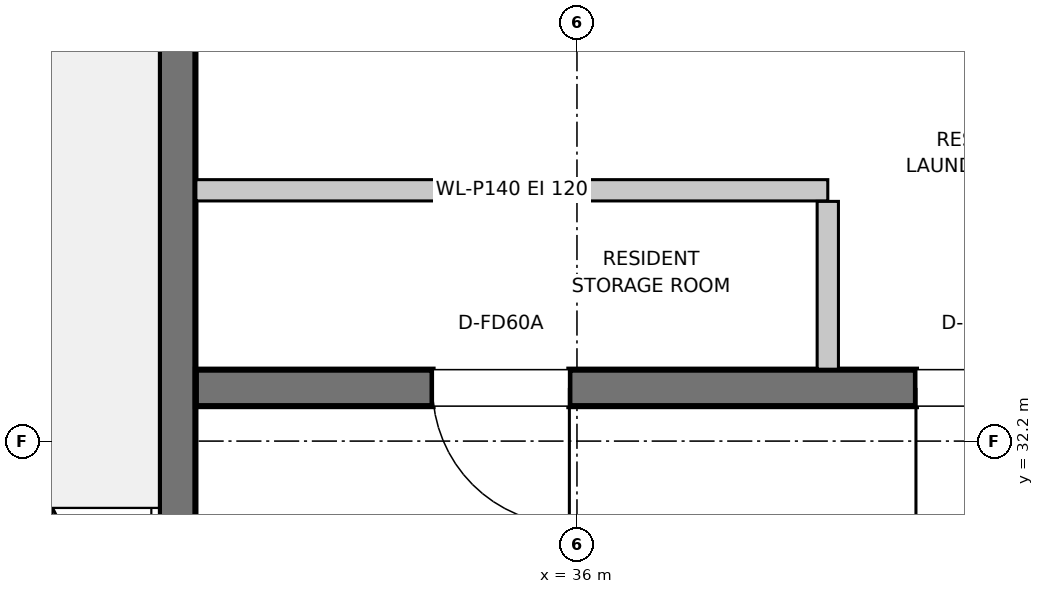
"""IFC4 building model, lengths in metres.
Left out: names, types, materials, properties, quantities, classifications, styles, units other than length and angle.
Written with IfcOpenShell. Run it as: python <this file> out.ifc"""

import sys

from ifc_helpers import new_model, si_unit, direction, frame, frame_2d, origin, place, context, subcontext, project, spatial, rectangle, extrude, element, fill, save


model = new_model("IFC4")
c1 = context("Model", 3, precision=1e-05, world=origin(), true_north=direction((0.0, 1.0)))
c2 = subcontext(c1, "Body", "Model", "MODEL_VIEW")
j1 = project(units=[si_unit("LENGTHUNIT", "METRE"), si_unit("PLANEANGLEUNIT", "RADIAN")], contexts=[c1])
p1 = place(None, origin())
s1 = spatial("IfcSite", under=j1, at=p1, CompositionType="ELEMENT")
p2 = place(p1, origin())
s2 = spatial("IfcBuilding", under=s1, at=p2, CompositionType="ELEMENT")
p3 = place(p2, frame((0.0, 0.0, 200.35)))
s3 = spatial("IfcBuildingStorey", under=s2, at=p3, CompositionType="ELEMENT", Elevation=200.35)
p4 = place(p3, frame((33.37, 26.953, 0.0), z_axis=(0.0, 0.0, 1.0), x_axis=(0.0, 1.0, 0.0)))
e1 = element("IfcWall", 1, at=p4, inside=s3, PredefinedType="SHEAR", context=c2, shape_type="SweptSolid", body=[
    extrude(rectangle(XDim=8.394, YDim=0.24, at=frame_2d((4.197, 0.0))), origin(), (0.0, 0.0, 1.0), 4.5),
])
p5 = place(p3, frame((33.493, 32.55, 0.0), z_axis=(0.0, 0.0, 1.0), x_axis=(1.0, 0.0, 0.0)))
e2 = element("IfcWall", 2, at=p5, inside=s3, PredefinedType="SHEAR", context=c2, shape_type="SweptSolid", body=[
    extrude(rectangle(XDim=13.214, YDim=0.24, at=frame_2d((6.607, 0.0))), origin(), (0.0, 0.0, 1.0), 4.5),
])
p6 = place(p5, frame((1.557, 0.0, 0.0)))
e3 = element("IfcOpeningElement", 3, at=p6, cuts=e2, PredefinedType="OPENING", context=c2, shape_type="SweptSolid", body=[
    extrude(rectangle(XDim=0.9, YDim=2.0, at=frame_2d((0.45, 1.0))), frame((0.0, 0.13, 0.0), z_axis=(0.0, -1.0, 0.0), x_axis=(1.0, 0.0, 0.0)), (0.0, 0.0, 1.0), 0.26),
])
p7 = place(p5, frame((4.737, 0.0, 0.0)))
e4 = element("IfcOpeningElement", 4, at=p7, cuts=e2, PredefinedType="OPENING", context=c2, shape_type="SweptSolid", body=[
    extrude(rectangle(XDim=0.9, YDim=2.0, at=frame_2d((0.45, 1.0))), frame((0.0, 0.13, 0.0), z_axis=(0.0, -1.0, 0.0), x_axis=(1.0, 0.0, 0.0)), (0.0, 0.0, 1.0), 0.26),
])
p8 = place(p5, frame((7.497, 0.0, 0.0)))
e5 = element("IfcOpeningElement", 5, at=p8, cuts=e2, PredefinedType="OPENING", context=c2, shape_type="SweptSolid", body=[
    extrude(rectangle(XDim=1.12, YDim=2.0, at=frame_2d((0.56, 1.0))), frame((0.0, 0.13, 0.0), z_axis=(0.0, -1.0, 0.0), x_axis=(1.0, 0.0, 0.0)), (0.0, 0.0, 1.0), 0.26),
])
p9 = place(p5, frame((9.597, 0.0, 0.0)))
e6 = element("IfcOpeningElement", 6, at=p9, cuts=e2, PredefinedType="OPENING", context=c2, shape_type="SweptSolid", body=[
    extrude(rectangle(XDim=1.12, YDim=2.0, at=frame_2d((0.56, 1.0))), frame((0.0, 0.13, 0.0), z_axis=(0.0, -1.0, 0.0), x_axis=(1.0, 0.0, 0.0)), (0.0, 0.0, 1.0), 0.26),
])
p10 = place(p5, frame((11.697, 0.0, 0.0)))
e7 = element("IfcOpeningElement", 7, at=p10, cuts=e2, PredefinedType="OPENING", context=c2, shape_type="SweptSolid", body=[
    extrude(rectangle(XDim=1.12, YDim=2.0, at=frame_2d((0.56, 1.0))), frame((0.0, 0.13, 0.0), z_axis=(0.0, -1.0, 0.0), x_axis=(1.0, 0.0, 0.0)), (0.0, 0.0, 1.0), 0.26),
])
p11 = place(p3, frame((33.493, 33.85, 0.0), z_axis=(0.0, 0.0, 1.0), x_axis=(1.0, 0.0, 0.0)))
e8 = element("IfcWall", 8, at=p11, inside=s3, PredefinedType="PARTITIONING", context=c2, shape_type="SweptSolid", body=[
    extrude(rectangle(XDim=4.157, YDim=0.14, at=frame_2d((2.079, 0.0))), origin(), (0.0, 0.0, 1.0), 4.245),
])
p12 = place(p3, frame((37.65, 32.673, 0.0), z_axis=(0.0, 0.0, 1.0), x_axis=(0.0, 1.0, 0.0)))
e9 = element("IfcWall", 9, at=p12, inside=s3, PredefinedType="PARTITIONING", context=c2, shape_type="SweptSolid", body=[
    extrude(rectangle(XDim=1.104, YDim=0.14, at=frame_2d((0.552, 0.0))), origin(), (0.0, 0.0, 1.0), 4.245),
])
p13 = place(p6, frame((0.9, 0.0, 0.0), z_axis=(0.0, 0.0, 1.0), x_axis=(-1.0, 0.0, 0.0)))
e10 = element("IfcDoor", 10, at=p13, inside=s3, OperationType="SINGLE_SWING_LEFT", PredefinedType="DOOR", context=c2, shape_type="SweptSolid", body=[
    extrude(rectangle(XDim=0.9, YDim=2.0, at=frame_2d((0.45, 1.0))), frame((0.0, 0.025, 0.0), z_axis=(0.0, -1.0, 0.0), x_axis=(1.0, 0.0, 0.0)), (0.0, 0.0, 1.0), 0.05),
])
fill(e3, e10)
p14 = place(p7, frame((0.9, 0.0, 0.0), z_axis=(0.0, 0.0, 1.0), x_axis=(-1.0, 0.0, 0.0)))
e11 = element("IfcDoor", 11, at=p14, inside=s3, OperationType="SINGLE_SWING_RIGHT", PredefinedType="DOOR", context=c2, shape_type="SweptSolid", body=[
    extrude(rectangle(XDim=0.9, YDim=2.0, at=frame_2d((0.45, 1.0))), frame((0.0, 0.025, 0.0), z_axis=(0.0, -1.0, 0.0), x_axis=(1.0, 0.0, 0.0)), (0.0, 0.0, 1.0), 0.05),
])
fill(e4, e11)
save(model, sys.argv[1])
